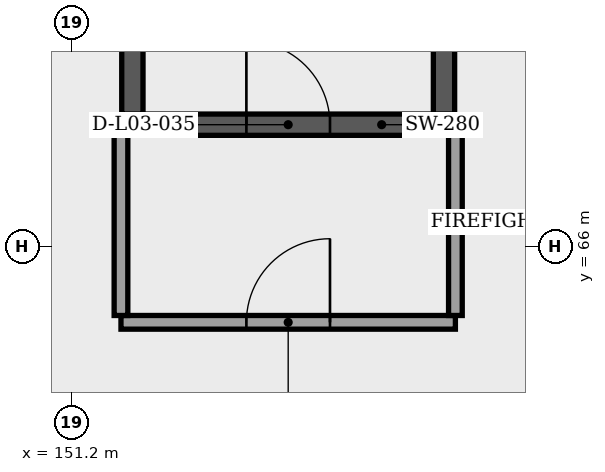
"""IFC4 building model, lengths in metres.
Left out: names, types, materials, properties, quantities, classifications, styles, units other than length and angle.
Written with IfcOpenShell. Run it as: python <this file> out.ifc"""

import sys

from ifc_helpers import new_model, si_unit, direction, frame, frame_2d, origin, place, context, subcontext, project, spatial, rectangle, extrude, element, fill, save


model = new_model("IFC4")
c1 = context("Model", 3, precision=1e-05, world=origin(), true_north=direction((0.0, 1.0)))
c2 = subcontext(c1, "Body", "Model", "MODEL_VIEW")
j1 = project(units=[si_unit("LENGTHUNIT", "METRE"), si_unit("PLANEANGLEUNIT", "RADIAN")], contexts=[c1])
p1 = place(None, origin())
s1 = spatial("IfcSite", under=j1, at=p1, CompositionType="ELEMENT")
p2 = place(p1, origin())
s2 = spatial("IfcBuilding", under=s1, at=p2, CompositionType="ELEMENT")
p3 = place(p2, frame((0.0, 0.0, 10.2)))
s3 = spatial("IfcBuildingStorey", under=s2, at=p3, CompositionType="ELEMENT", Elevation=10.2)
p4 = place(p3, frame((152.0, 67.6, 0.0), z_axis=(0.0, 0.0, 1.0), x_axis=(1.0, 0.0, 0.0)))
e1 = element("IfcWall", 1, at=p4, inside=s3, PredefinedType="SHEAR", context=c2, shape_type="SweptSolid", body=[
    extrude(rectangle(XDim=4.1, YDim=0.28, at=frame_2d((2.05, 0.0))), origin(), (0.0, 0.0, 1.0), 5.1),
])
p5 = place(p4, frame((1.5, 0.0, 0.0)))
e2 = element("IfcOpeningElement", 2, at=p5, cuts=e1, PredefinedType="OPENING", context=c2, shape_type="SweptSolid", body=[
    extrude(rectangle(XDim=1.1, YDim=2.2, at=frame_2d((0.55, 1.1))), frame((0.0, 0.15, 0.0), z_axis=(0.0, -1.0, 0.0), x_axis=(1.0, 0.0, 0.0)), (0.0, 0.0, 1.0), 0.3),
])
for number, where, z_axis, x_axis in (
    (3, (152.0, 67.74, 0.0), (0.0, 0.0, 1.0), (0.0, 1.0, 0.0)),
    (4, (156.1, 67.74, 0.0), (0.0, 0.0, 1.0), (0.0, 1.0, 0.0)),
):
    element("IfcWall", number, at=place(p3, frame(where, z_axis=z_axis, x_axis=x_axis)), inside=s3, PredefinedType="SHEAR", context=c2, shape_type="SweptSolid", body=[
        extrude(rectangle(XDim=8.72, YDim=0.28, at=frame_2d((4.36, 0.0))), origin(), (0.0, 0.0, 1.0), 5.1),
    ])
p6 = place(p3, frame((151.85, 65.0, 0.0), z_axis=(0.0, 0.0, 1.0), x_axis=(1.0, 0.0, 0.0)))
e5 = element("IfcWall", 5, at=p6, inside=s3, PredefinedType="SOLIDWALL", context=c2, shape_type="SweptSolid", body=[
    extrude(rectangle(XDim=4.4, YDim=0.18, at=frame_2d((2.2, 0.0))), origin(), (0.0, 0.0, 1.0), 3.9),
])
p7 = place(p6, frame((1.65, 0.0, 0.0)))
e6 = element("IfcOpeningElement", 6, at=p7, cuts=e5, PredefinedType="OPENING", context=c2, shape_type="SweptSolid", body=[
    extrude(rectangle(XDim=1.1, YDim=2.2, at=frame_2d((0.55, 1.1))), frame((0.0, 0.1, 0.0), z_axis=(0.0, -1.0, 0.0), x_axis=(1.0, 0.0, 0.0)), (0.0, 0.0, 1.0), 0.2),
])
for number, where, z_axis, x_axis in (
    (7, (151.85, 65.09, 0.0), (0.0, 0.0, 1.0), (0.0, 1.0, 0.0)),
    (8, (156.25, 65.09, 0.0), (0.0, 0.0, 1.0), (0.0, 1.0, 0.0)),
):
    element("IfcWall", number, at=place(p3, frame(where, z_axis=z_axis, x_axis=x_axis)), inside=s3, PredefinedType="SOLIDWALL", context=c2, shape_type="SweptSolid", body=[
        extrude(rectangle(XDim=2.51, YDim=0.18, at=frame_2d((1.255, 0.0))), origin(), (0.0, 0.0, 1.0), 3.9),
    ])
p8 = place(p5, origin())
e9 = element("IfcDoor", 9, at=p8, inside=s3, OperationType="SINGLE_SWING_LEFT", PredefinedType="DOOR", context=c2, shape_type="SweptSolid", body=[
    extrude(rectangle(XDim=1.1, YDim=2.2, at=frame_2d((0.55, 1.1))), frame((0.0, 0.025, 0.0), z_axis=(0.0, -1.0, 0.0), x_axis=(1.0, 0.0, 0.0)), (0.0, 0.0, 1.0), 0.05),
])
fill(e2, e9)
p9 = place(p7, origin())
e10 = element("IfcDoor", 10, at=p9, inside=s3, OperationType="SINGLE_SWING_RIGHT", PredefinedType="DOOR", context=c2, shape_type="SweptSolid", body=[
    extrude(rectangle(XDim=1.1, YDim=2.2, at=frame_2d((0.55, 1.1))), frame((0.0, 0.025, 0.0), z_axis=(0.0, -1.0, 0.0), x_axis=(1.0, 0.0, 0.0)), (0.0, 0.0, 1.0), 0.05),
])
fill(e6, e10)
save(model, sys.argv[1])
